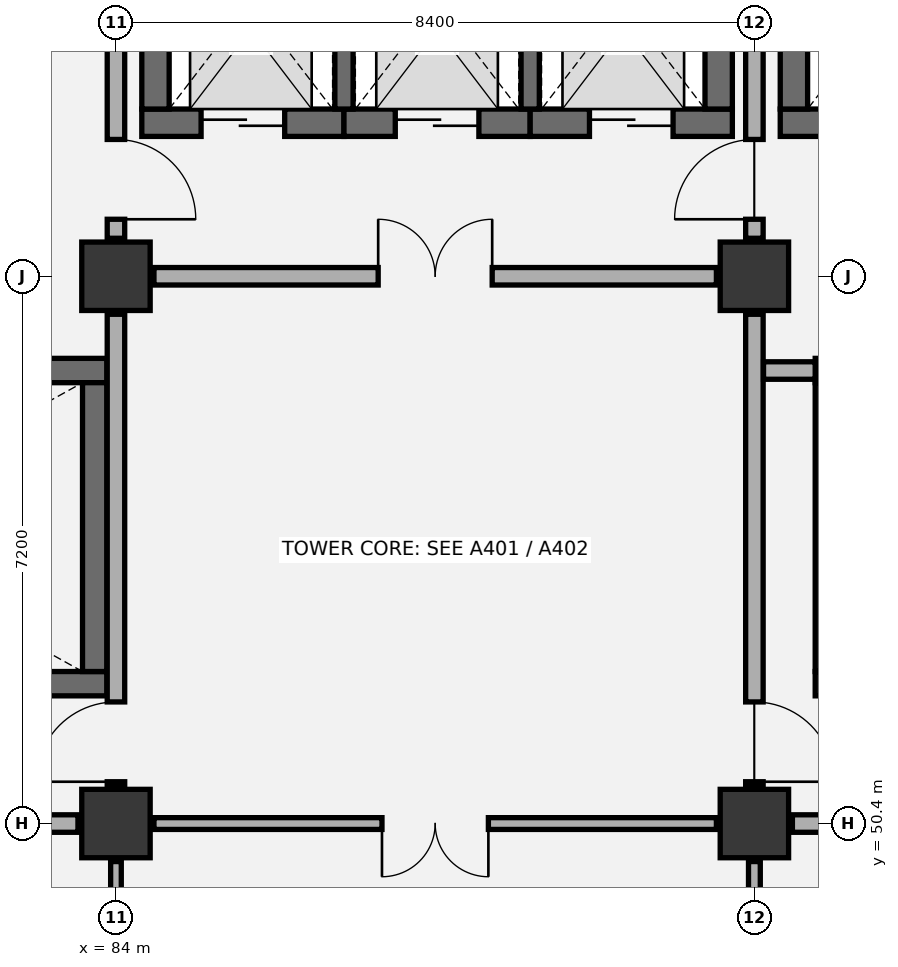
"""IFC4 building model, lengths in metres.
Left out: names, types, materials, properties, quantities, classifications, styles, units other than length and angle.
Written with IfcOpenShell. Run it as: python <this file> out.ifc"""

import sys

from ifc_helpers import new_model, si_unit, direction, frame, frame_2d, origin, origin_2d, place, context, subcontext, project, spatial, rectangle, extrude, element, fill, save


model = new_model("IFC4")
c1 = context("Model", 3, precision=1e-05, world=origin(), true_north=direction((0.0, 1.0)))
c2 = subcontext(c1, "Body", "Model", "MODEL_VIEW")
j1 = project(units=[si_unit("LENGTHUNIT", "METRE"), si_unit("PLANEANGLEUNIT", "RADIAN")], contexts=[c1])
p1 = place(None, origin())
s1 = spatial("IfcSite", under=j1, at=p1, CompositionType="ELEMENT")
p2 = place(p1, origin())
s2 = spatial("IfcBuilding", under=s1, at=p2, CompositionType="ELEMENT")
p3 = place(p2, frame((0.0, 0.0, 6.0)))
s3 = spatial("IfcBuildingStorey", under=s2, at=p3, CompositionType="ELEMENT", Elevation=6.0)
for number, where, z_axis, x_axis in (
    (1, (84.0, 50.4, 0.0), (0.0, 0.0, 1.0), (1.0, 0.0, 0.0)),
    (2, (84.0, 57.6, 0.0), (0.0, 0.0, 1.0), (1.0, 0.0, 0.0)),
    (3, (92.4, 50.4, 0.0), (0.0, 0.0, 1.0), (1.0, 0.0, 0.0)),
    (4, (92.4, 57.6, 0.0), (0.0, 0.0, 1.0), (1.0, 0.0, 0.0)),
):
    element("IfcColumn", number, at=place(p3, frame(where, z_axis=z_axis, x_axis=x_axis)), inside=s3, PredefinedType="COLUMN", context=c2, shape_type="SweptSolid", body=[
        extrude(rectangle(XDim=0.9, YDim=0.9, at=origin_2d()), origin(), (0.0, 0.0, 1.0), 5.4),
    ])
p4 = place(p3, frame((76.4, 52.24, 0.0), z_axis=(0.0, 0.0, 1.0), x_axis=(1.0, 0.0, 0.0)))
e5 = element("IfcWall", 5, at=p4, inside=s3, PredefinedType="SHEAR", context=c2, shape_type="SweptSolid", body=[
    extrude(rectangle(XDim=7.48, YDim=0.32, at=frame_2d((3.74, 0.0))), origin(), (0.0, 0.0, 1.0), 5.075),
])
p5 = place(p4, frame((0.45, 0.0, 0.0)))
e6 = element("IfcOpeningElement", 6, at=p5, cuts=e5, PredefinedType="OPENING", context=c2, shape_type="SweptSolid", body=[
    extrude(rectangle(XDim=1.05, YDim=2.15, at=frame_2d((0.525, 1.075))), frame((0.0, 0.17, 0.0), z_axis=(0.0, -1.0, 0.0), x_axis=(1.0, 0.0, 0.0)), (0.0, 0.0, 1.0), 0.34),
])
p6 = place(p3, frame((76.4, 56.36, 0.0), z_axis=(0.0, 0.0, 1.0), x_axis=(1.0, 0.0, 0.0)))
e7 = element("IfcWall", 7, at=p6, inside=s3, PredefinedType="SHEAR", context=c2, shape_type="SweptSolid", body=[
    extrude(rectangle(XDim=7.48, YDim=0.32, at=frame_2d((3.74, 0.0))), origin(), (0.0, 0.0, 1.0), 5.075),
])
p7 = place(p3, frame((83.72, 52.4, 0.0), z_axis=(0.0, 0.0, 1.0), x_axis=(0.0, 1.0, 0.0)))
e8 = element("IfcWall", 8, at=p7, inside=s3, PredefinedType="SHEAR", context=c2, shape_type="SweptSolid", body=[
    extrude(rectangle(XDim=3.8, YDim=0.32, at=frame_2d((1.9, 0.0))), origin(), (0.0, 0.0, 1.0), 5.075),
])
p8 = place(p3, frame((93.2, 52.24, 0.0), z_axis=(0.0, 0.0, 1.0), x_axis=(1.0, 0.0, 0.0)))
e9 = element("IfcWall", 9, at=p8, inside=s3, PredefinedType="SHEAR", context=c2, shape_type="SweptSolid", body=[
    extrude(rectangle(XDim=7.48, YDim=0.32, at=frame_2d((3.74, 0.0))), origin(), (0.0, 0.0, 1.0), 5.075),
])
p9 = place(p8, frame((0.45, 0.0, 0.0)))
e10 = element("IfcOpeningElement", 10, at=p9, cuts=e9, PredefinedType="OPENING", context=c2, shape_type="SweptSolid", body=[
    extrude(rectangle(XDim=1.05, YDim=2.15, at=frame_2d((0.525, 1.075))), frame((0.0, 0.17, 0.0), z_axis=(0.0, -1.0, 0.0), x_axis=(1.0, 0.0, 0.0)), (0.0, 0.0, 1.0), 0.34),
])
p10 = place(p3, frame((93.2, 56.36, 0.0), z_axis=(0.0, 0.0, 1.0), x_axis=(1.0, 0.0, 0.0)))
e11 = element("IfcWall", 11, at=p10, inside=s3, PredefinedType="SHEAR", context=c2, shape_type="SweptSolid", body=[
    extrude(rectangle(XDim=7.48, YDim=0.32, at=frame_2d((3.74, 0.0))), origin(), (0.0, 0.0, 1.0), 5.075),
])
p11 = place(p3, frame((93.36, 52.4, 0.0), z_axis=(0.0, 0.0, 1.0), x_axis=(0.0, 1.0, 0.0)))
e12 = element("IfcWall", 12, at=p11, inside=s3, PredefinedType="SHEAR", context=c2, shape_type="SweptSolid", body=[
    extrude(rectangle(XDim=3.8, YDim=0.32, at=frame_2d((1.9, 0.0))), origin(), (0.0, 0.0, 1.0), 5.075),
])
p12 = place(p3, frame((84.34, 59.62, 0.0), z_axis=(0.0, 0.0, 1.0), x_axis=(1.0, 0.0, 0.0)))
e13 = element("IfcWall", 13, at=p12, inside=s3, PredefinedType="SHEAR", context=c2, shape_type="SweptSolid", body=[
    extrude(rectangle(XDim=2.66, YDim=0.36, at=frame_2d((1.33, 0.0))), origin(), (0.0, 0.0, 1.0), 5.075),
])
p13 = place(p12, frame((0.78, 0.0, 0.0)))
e14 = element("IfcOpeningElement", 14, at=p13, cuts=e13, PredefinedType="OPENING", context=c2, shape_type="SweptSolid", body=[
    extrude(rectangle(XDim=1.1, YDim=2.15, at=frame_2d((0.55, 1.075))), frame((0.0, 0.19, 0.0), z_axis=(0.0, -1.0, 0.0), x_axis=(1.0, 0.0, 0.0)), (0.0, 0.0, 1.0), 0.38),
])
p14 = place(p3, frame((87.0, 59.62, 0.0), z_axis=(0.0, 0.0, 1.0), x_axis=(1.0, 0.0, 0.0)))
e15 = element("IfcWall", 15, at=p14, inside=s3, PredefinedType="SHEAR", context=c2, shape_type="SweptSolid", body=[
    extrude(rectangle(XDim=2.45, YDim=0.36, at=frame_2d((1.225, 0.0))), origin(), (0.0, 0.0, 1.0), 5.075),
])
p15 = place(p14, frame((0.675, 0.0, 0.0)))
e16 = element("IfcOpeningElement", 16, at=p15, cuts=e15, PredefinedType="OPENING", context=c2, shape_type="SweptSolid", body=[
    extrude(rectangle(XDim=1.1, YDim=2.15, at=frame_2d((0.55, 1.075))), frame((0.0, 0.19, 0.0), z_axis=(0.0, -1.0, 0.0), x_axis=(1.0, 0.0, 0.0)), (0.0, 0.0, 1.0), 0.38),
])
p16 = place(p3, frame((89.45, 59.62, 0.0), z_axis=(0.0, 0.0, 1.0), x_axis=(1.0, 0.0, 0.0)))
e17 = element("IfcWall", 17, at=p16, inside=s3, PredefinedType="SHEAR", context=c2, shape_type="SweptSolid", body=[
    extrude(rectangle(XDim=2.66, YDim=0.36, at=frame_2d((1.33, 0.0))), origin(), (0.0, 0.0, 1.0), 5.075),
])
p17 = place(p16, frame((0.78, 0.0, 0.0)))
e18 = element("IfcOpeningElement", 18, at=p17, cuts=e17, PredefinedType="OPENING", context=c2, shape_type="SweptSolid", body=[
    extrude(rectangle(XDim=1.1, YDim=2.15, at=frame_2d((0.55, 1.075))), frame((0.0, 0.19, 0.0), z_axis=(0.0, -1.0, 0.0), x_axis=(1.0, 0.0, 0.0)), (0.0, 0.0, 1.0), 0.38),
])
for number, where, z_axis, x_axis in (
    (19, (84.52, 59.8, 0.0), (0.0, 0.0, 1.0), (0.0, 1.0, 0.0)),
    (20, (91.93, 59.8, 0.0), (0.0, 0.0, 1.0), (0.0, 1.0, 0.0)),
):
    element("IfcWall", number, at=place(p3, frame(where, z_axis=z_axis, x_axis=x_axis)), inside=s3, PredefinedType="SHEAR", context=c2, shape_type="SweptSolid", body=[
        extrude(rectangle(XDim=2.8, YDim=0.36, at=frame_2d((1.4, 0.0))), origin(), (0.0, 0.0, 1.0), 5.075),
    ])
for number, where, z_axis, x_axis in (
    (21, (87.0, 59.8, 0.0), (0.0, 0.0, 1.0), (0.0, 1.0, 0.0)),
    (22, (89.45, 59.8, 0.0), (0.0, 0.0, 1.0), (0.0, 1.0, 0.0)),
):
    element("IfcWall", number, at=place(p3, frame(where, z_axis=z_axis, x_axis=x_axis)), inside=s3, PredefinedType="SHEAR", context=c2, shape_type="SweptSolid", body=[
        extrude(rectangle(XDim=2.8, YDim=0.24, at=frame_2d((1.4, 0.0))), origin(), (0.0, 0.0, 1.0), 5.075),
    ])
p18 = place(p3, frame((92.74, 59.62, 0.0), z_axis=(0.0, 0.0, 1.0), x_axis=(1.0, 0.0, 0.0)))
e23 = element("IfcWall", 23, at=p18, inside=s3, PredefinedType="SHEAR", context=c2, shape_type="SweptSolid", body=[
    extrude(rectangle(XDim=2.87, YDim=0.36, at=frame_2d((1.435, 0.0))), origin(), (0.0, 0.0, 1.0), 5.075),
])
p19 = place(p18, frame((0.76, 0.0, 0.0)))
e24 = element("IfcOpeningElement", 24, at=p19, cuts=e23, PredefinedType="OPENING", context=c2, shape_type="SweptSolid", body=[
    extrude(rectangle(XDim=1.35, YDim=2.2, at=frame_2d((0.675, 1.1))), frame((0.0, 0.19, 0.0), z_axis=(0.0, -1.0, 0.0), x_axis=(1.0, 0.0, 0.0)), (0.0, 0.0, 1.0), 0.38),
])
p20 = place(p3, frame((92.92, 59.8, 0.0), z_axis=(0.0, 0.0, 1.0), x_axis=(0.0, 1.0, 0.0)))
e25 = element("IfcWall", 25, at=p20, inside=s3, PredefinedType="SHEAR", context=c2, shape_type="SweptSolid", body=[
    extrude(rectangle(XDim=2.8, YDim=0.36, at=frame_2d((1.4, 0.0))), origin(), (0.0, 0.0, 1.0), 5.075),
])
p21 = place(p3, frame((84.0, 43.7, 0.0), z_axis=(0.0, 0.0, 1.0), x_axis=(0.0, 1.0, 0.0)))
e26 = element("IfcWall", 26, at=p21, inside=s3, PredefinedType="PARTITIONING", context=c2, shape_type="SweptSolid", body=[
    extrude(rectangle(XDim=6.2, YDim=0.14, at=frame_2d((3.1, 0.0))), origin(), (0.0, 0.0, 1.0), 4.32),
])
p22 = place(p21, frame((2.4, 0.0, 0.0)))
e27 = element("IfcOpeningElement", 27, at=p22, cuts=e26, PredefinedType="OPENING", context=c2, shape_type="SweptSolid", body=[
    extrude(rectangle(XDim=1.4, YDim=2.15, at=frame_2d((0.7, 1.075))), frame((0.0, 0.08, 0.0), z_axis=(0.0, -1.0, 0.0), x_axis=(1.0, 0.0, 0.0)), (0.0, 0.0, 1.0), 0.16),
])
p23 = place(p3, frame((76.1, 50.4, 0.0), z_axis=(0.0, 0.0, 1.0), x_axis=(1.0, 0.0, 0.0)))
e28 = element("IfcWall", 28, at=p23, inside=s3, PredefinedType="PARTITIONING", context=c2, shape_type="SweptSolid", body=[
    extrude(rectangle(XDim=7.4, YDim=0.23, at=frame_2d((3.7, 0.0))), origin(), (0.0, 0.0, 1.0), 4.27),
])
p24 = place(p23, frame((2.95, 0.0, 0.0)))
e29 = element("IfcOpeningElement", 29, at=p24, cuts=e28, PredefinedType="OPENING", context=c2, shape_type="SweptSolid", body=[
    extrude(rectangle(XDim=1.5, YDim=2.15, at=frame_2d((0.75, 1.075))), frame((0.0, 0.125, 0.0), z_axis=(0.0, -1.0, 0.0), x_axis=(1.0, 0.0, 0.0)), (0.0, 0.0, 1.0), 0.25),
])
p25 = place(p3, frame((84.0, 50.9, 0.0), z_axis=(0.0, 0.0, 1.0), x_axis=(0.0, 1.0, 0.0)))
e30 = element("IfcWall", 30, at=p25, inside=s3, PredefinedType="PARTITIONING", context=c2, shape_type="SweptSolid", body=[
    extrude(rectangle(XDim=6.2, YDim=0.23, at=frame_2d((3.1, 0.0))), origin(), (0.0, 0.0, 1.0), 4.67),
])
p26 = place(p25, frame((0.05, 0.0, 0.0)))
e31 = element("IfcOpeningElement", 31, at=p26, cuts=e30, PredefinedType="OPENING", context=c2, shape_type="SweptSolid", body=[
    extrude(rectangle(XDim=1.05, YDim=2.15, at=frame_2d((0.525, 1.075))), frame((0.0, 0.125, 0.0), z_axis=(0.0, -1.0, 0.0), x_axis=(1.0, 0.0, 0.0)), (0.0, 0.0, 1.0), 0.25),
])
p27 = place(p3, frame((84.0, 58.1, 0.0), z_axis=(0.0, 0.0, 1.0), x_axis=(0.0, 1.0, 0.0)))
e32 = element("IfcWall", 32, at=p27, inside=s3, PredefinedType="PARTITIONING", context=c2, shape_type="SweptSolid", body=[
    extrude(rectangle(XDim=6.2, YDim=0.23, at=frame_2d((3.1, 0.0))), origin(), (0.0, 0.0, 1.0), 4.32),
])
p28 = place(p27, frame((0.25, 0.0, 0.0)))
e33 = element("IfcOpeningElement", 33, at=p28, cuts=e32, PredefinedType="OPENING", context=c2, shape_type="SweptSolid", body=[
    extrude(rectangle(XDim=1.05, YDim=2.15, at=frame_2d((0.525, 1.075))), frame((0.0, 0.125, 0.0), z_axis=(0.0, -1.0, 0.0), x_axis=(1.0, 0.0, 0.0)), (0.0, 0.0, 1.0), 0.25),
])
p29 = place(p3, frame((92.4, 43.7, 0.0), z_axis=(0.0, 0.0, 1.0), x_axis=(0.0, 1.0, 0.0)))
e34 = element("IfcWall", 34, at=p29, inside=s3, PredefinedType="PARTITIONING", context=c2, shape_type="SweptSolid", body=[
    extrude(rectangle(XDim=6.2, YDim=0.155, at=frame_2d((3.1, 0.0))), origin(), (0.0, 0.0, 1.0), 4.67),
])
p30 = place(p29, frame((2.25, 0.0, 0.0)))
e35 = element("IfcOpeningElement", 35, at=p30, cuts=e34, PredefinedType="OPENING", context=c2, shape_type="SweptSolid", body=[
    extrude(rectangle(XDim=1.7, YDim=2.25, at=frame_2d((0.85, 1.125))), frame((0.0, 0.087, 0.0), z_axis=(0.0, -1.0, 0.0), x_axis=(1.0, 0.0, 0.0)), (0.0, 0.0, 1.0), 0.175),
])
p31 = place(p3, frame((84.5, 50.4, 0.0), z_axis=(0.0, 0.0, 1.0), x_axis=(1.0, 0.0, 0.0)))
e36 = element("IfcWall", 36, at=p31, inside=s3, PredefinedType="PARTITIONING", context=c2, shape_type="SweptSolid", body=[
    extrude(rectangle(XDim=7.4, YDim=0.155, at=frame_2d((3.7, 0.0))), origin(), (0.0, 0.0, 1.0), 4.27),
])
p32 = place(p31, frame((3.0, 0.0, 0.0)))
e37 = element("IfcOpeningElement", 37, at=p32, cuts=e36, PredefinedType="OPENING", context=c2, shape_type="SweptSolid", body=[
    extrude(rectangle(XDim=1.4, YDim=2.15, at=frame_2d((0.7, 1.075))), frame((0.0, 0.087, 0.0), z_axis=(0.0, -1.0, 0.0), x_axis=(1.0, 0.0, 0.0)), (0.0, 0.0, 1.0), 0.175),
])
p33 = place(p3, frame((92.4, 50.9, 0.0), z_axis=(0.0, 0.0, 1.0), x_axis=(0.0, 1.0, 0.0)))
e38 = element("IfcWall", 38, at=p33, inside=s3, PredefinedType="PARTITIONING", context=c2, shape_type="SweptSolid", body=[
    extrude(rectangle(XDim=6.2, YDim=0.23, at=frame_2d((3.1, 0.0))), origin(), (0.0, 0.0, 1.0), 4.32),
])
p34 = place(p33, frame((0.05, 0.0, 0.0)))
e39 = element("IfcOpeningElement", 39, at=p34, cuts=e38, PredefinedType="OPENING", context=c2, shape_type="SweptSolid", body=[
    extrude(rectangle(XDim=1.05, YDim=2.15, at=frame_2d((0.525, 1.075))), frame((0.0, 0.125, 0.0), z_axis=(0.0, -1.0, 0.0), x_axis=(1.0, 0.0, 0.0)), (0.0, 0.0, 1.0), 0.25),
])
p35 = place(p3, frame((84.5, 57.6, 0.0), z_axis=(0.0, 0.0, 1.0), x_axis=(1.0, 0.0, 0.0)))
e40 = element("IfcWall", 40, at=p35, inside=s3, PredefinedType="PARTITIONING", context=c2, shape_type="SweptSolid", body=[
    extrude(rectangle(XDim=7.4, YDim=0.23, at=frame_2d((3.7, 0.0))), origin(), (0.0, 0.0, 1.0), 4.27),
])
p36 = place(p35, frame((2.95, 0.0, 0.0)))
e41 = element("IfcOpeningElement", 41, at=p36, cuts=e40, PredefinedType="OPENING", context=c2, shape_type="SweptSolid", body=[
    extrude(rectangle(XDim=1.5, YDim=2.15, at=frame_2d((0.75, 1.075))), frame((0.0, 0.125, 0.0), z_axis=(0.0, -1.0, 0.0), x_axis=(1.0, 0.0, 0.0)), (0.0, 0.0, 1.0), 0.25),
])
p37 = place(p3, frame((92.4, 58.1, 0.0), z_axis=(0.0, 0.0, 1.0), x_axis=(0.0, 1.0, 0.0)))
e42 = element("IfcWall", 42, at=p37, inside=s3, PredefinedType="PARTITIONING", context=c2, shape_type="SweptSolid", body=[
    extrude(rectangle(XDim=6.2, YDim=0.23, at=frame_2d((3.1, 0.0))), origin(), (0.0, 0.0, 1.0), 4.78),
])
p38 = place(p37, frame((0.25, 0.0, 0.0)))
e43 = element("IfcOpeningElement", 43, at=p38, cuts=e42, PredefinedType="OPENING", context=c2, shape_type="SweptSolid", body=[
    extrude(rectangle(XDim=1.05, YDim=2.15, at=frame_2d((0.525, 1.075))), frame((0.0, 0.125, 0.0), z_axis=(0.0, -1.0, 0.0), x_axis=(1.0, 0.0, 0.0)), (0.0, 0.0, 1.0), 0.25),
])
p39 = place(p3, frame((92.9, 50.4, 0.0), z_axis=(0.0, 0.0, 1.0), x_axis=(1.0, 0.0, 0.0)))
e44 = element("IfcWall", 44, at=p39, inside=s3, PredefinedType="PARTITIONING", context=c2, shape_type="SweptSolid", body=[
    extrude(rectangle(XDim=7.4, YDim=0.23, at=frame_2d((3.7, 0.0))), origin(), (0.0, 0.0, 1.0), 4.27),
])
p40 = place(p39, frame((2.95, 0.0, 0.0)))
e45 = element("IfcOpeningElement", 45, at=p40, cuts=e44, PredefinedType="OPENING", context=c2, shape_type="SweptSolid", body=[
    extrude(rectangle(XDim=1.5, YDim=2.15, at=frame_2d((0.75, 1.075))), frame((0.0, 0.125, 0.0), z_axis=(0.0, -1.0, 0.0), x_axis=(1.0, 0.0, 0.0)), (0.0, 0.0, 1.0), 0.25),
])
p41 = place(p3, frame((92.52, 56.36, 0.0), z_axis=(0.0, 0.0, 1.0), x_axis=(1.0, 0.0, 0.0)))
e46 = element("IfcWall", 46, at=p41, inside=s3, PredefinedType="PARTITIONING", context=c2, shape_type="SweptSolid", body=[
    extrude(rectangle(XDim=0.68, YDim=0.23, at=frame_2d((0.34, 0.0))), origin(), (0.0, 0.0, 1.0), 5.075),
])
p42 = place(p13, origin())
e47 = element("IfcDoor", 47, at=p42, inside=s3, OperationType="DOUBLE_DOOR_SLIDING", PredefinedType="DOOR", context=c2, shape_type="SweptSolid", body=[
    extrude(rectangle(XDim=1.1, YDim=2.15, at=frame_2d((0.55, 1.075))), frame((0.0, 0.025, 0.0), z_axis=(0.0, -1.0, 0.0), x_axis=(1.0, 0.0, 0.0)), (0.0, 0.0, 1.0), 0.05),
])
fill(e14, e47)
p43 = place(p15, origin())
e48 = element("IfcDoor", 48, at=p43, inside=s3, OperationType="DOUBLE_DOOR_SLIDING", PredefinedType="DOOR", context=c2, shape_type="SweptSolid", body=[
    extrude(rectangle(XDim=1.1, YDim=2.15, at=frame_2d((0.55, 1.075))), frame((0.0, 0.025, 0.0), z_axis=(0.0, -1.0, 0.0), x_axis=(1.0, 0.0, 0.0)), (0.0, 0.0, 1.0), 0.05),
])
fill(e16, e48)
p44 = place(p17, origin())
e49 = element("IfcDoor", 49, at=p44, inside=s3, OperationType="DOUBLE_DOOR_SLIDING", PredefinedType="DOOR", context=c2, shape_type="SweptSolid", body=[
    extrude(rectangle(XDim=1.1, YDim=2.15, at=frame_2d((0.55, 1.075))), frame((0.0, 0.025, 0.0), z_axis=(0.0, -1.0, 0.0), x_axis=(1.0, 0.0, 0.0)), (0.0, 0.0, 1.0), 0.05),
])
fill(e18, e49)
p45 = place(p26, origin())
e50 = element("IfcDoor", 50, at=p45, inside=s3, OperationType="SINGLE_SWING_LEFT", PredefinedType="DOOR", context=c2, shape_type="SweptSolid", body=[
    extrude(rectangle(XDim=1.05, YDim=2.15, at=frame_2d((0.525, 1.075))), frame((0.0, 0.025, 0.0), z_axis=(0.0, -1.0, 0.0), x_axis=(1.0, 0.0, 0.0)), (0.0, 0.0, 1.0), 0.05),
])
fill(e31, e50)
p46 = place(p28, frame((1.05, 0.0, 0.0), z_axis=(0.0, 0.0, 1.0), x_axis=(-1.0, 0.0, 0.0)))
e51 = element("IfcDoor", 51, at=p46, inside=s3, OperationType="SINGLE_SWING_RIGHT", PredefinedType="DOOR", context=c2, shape_type="SweptSolid", body=[
    extrude(rectangle(XDim=1.05, YDim=2.15, at=frame_2d((0.525, 1.075))), frame((0.0, 0.025, 0.0), z_axis=(0.0, -1.0, 0.0), x_axis=(1.0, 0.0, 0.0)), (0.0, 0.0, 1.0), 0.05),
])
fill(e33, e51)
p47 = place(p32, frame((1.4, 0.0, 0.0), z_axis=(0.0, 0.0, 1.0), x_axis=(-1.0, 0.0, 0.0)))
e52 = element("IfcDoor", 52, at=p47, inside=s3, OperationType="DOUBLE_DOOR_SINGLE_SWING", PredefinedType="DOOR", context=c2, shape_type="SweptSolid", body=[
    extrude(rectangle(XDim=1.4, YDim=2.15, at=frame_2d((0.7, 1.075))), frame((0.0, 0.025, 0.0), z_axis=(0.0, -1.0, 0.0), x_axis=(1.0, 0.0, 0.0)), (0.0, 0.0, 1.0), 0.05),
])
fill(e37, e52)
p48 = place(p34, frame((1.05, 0.0, 0.0), z_axis=(0.0, 0.0, 1.0), x_axis=(-1.0, 0.0, 0.0)))
e53 = element("IfcDoor", 53, at=p48, inside=s3, OperationType="SINGLE_SWING_RIGHT", PredefinedType="DOOR", context=c2, shape_type="SweptSolid", body=[
    extrude(rectangle(XDim=1.05, YDim=2.15, at=frame_2d((0.525, 1.075))), frame((0.0, 0.025, 0.0), z_axis=(0.0, -1.0, 0.0), x_axis=(1.0, 0.0, 0.0)), (0.0, 0.0, 1.0), 0.05),
])
fill(e39, e53)
p49 = place(p36, origin())
e54 = element("IfcDoor", 54, at=p49, inside=s3, OperationType="DOUBLE_DOOR_SINGLE_SWING", PredefinedType="DOOR", context=c2, shape_type="SweptSolid", body=[
    extrude(rectangle(XDim=1.5, YDim=2.15, at=frame_2d((0.75, 1.075))), frame((0.0, 0.025, 0.0), z_axis=(0.0, -1.0, 0.0), x_axis=(1.0, 0.0, 0.0)), (0.0, 0.0, 1.0), 0.05),
])
fill(e41, e54)
p50 = place(p38, origin())
e55 = element("IfcDoor", 55, at=p50, inside=s3, OperationType="SINGLE_SWING_LEFT", PredefinedType="DOOR", context=c2, shape_type="SweptSolid", body=[
    extrude(rectangle(XDim=1.05, YDim=2.15, at=frame_2d((0.525, 1.075))), frame((0.0, 0.025, 0.0), z_axis=(0.0, -1.0, 0.0), x_axis=(1.0, 0.0, 0.0)), (0.0, 0.0, 1.0), 0.05),
])
fill(e43, e55)
save(model, sys.argv[1])
